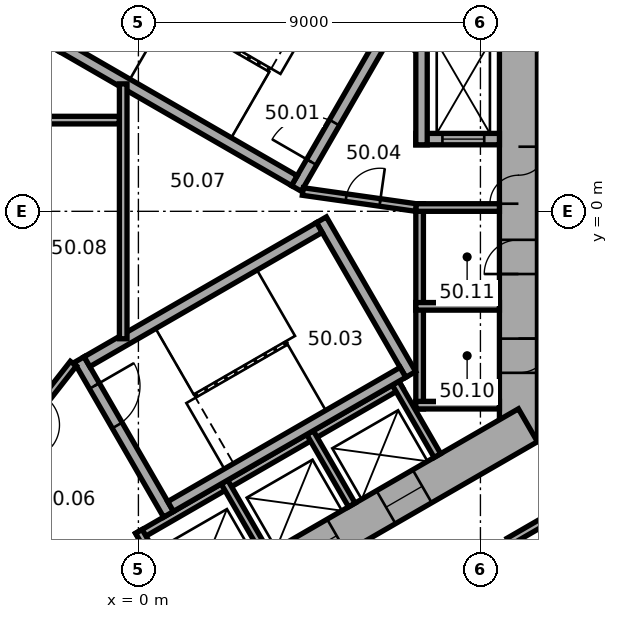
"""IFC4 building model, lengths in metres.
Left out: names, types, materials, properties, quantities, classifications, styles, units other than length and angle.
Written with IfcOpenShell. Run it as: python <this file> out.ifc"""

import sys

from ifc_helpers import new_model, si_unit, direction, frame, frame_2d, origin, place, context, subcontext, project, spatial, rectangle, extrude, element, fill, save


model = new_model("IFC4")
c1 = context("Model", 3, precision=1e-05, world=origin(), true_north=direction((0.0, 1.0)))
c2 = subcontext(c1, "Body", "Model", "MODEL_VIEW")
j1 = project(units=[si_unit("LENGTHUNIT", "METRE"), si_unit("PLANEANGLEUNIT", "RADIAN")], contexts=[c1])
p1 = place(None, origin())
s1 = spatial("IfcSite", under=j1, at=p1, CompositionType="ELEMENT")
p2 = place(p1, origin())
s2 = spatial("IfcBuilding", under=s1, at=p2, CompositionType="ELEMENT")
p3 = place(p2, frame((0.0, 0.0, 202.1)))
s3 = spatial("IfcBuildingStorey", under=s2, at=p3, CompositionType="ELEMENT", Elevation=202.1)
p4 = place(p3, frame((10.0, -6.062, 0.0), z_axis=(0.0, 0.0, 1.0), x_axis=(0.0, 1.0, 0.0)))
e1 = element("IfcWall", 1, at=p4, inside=s3, PredefinedType="SHEAR", context=c2, shape_type="SweptSolid", body=[
    extrude(rectangle(XDim=12.125, YDim=1.0, at=frame_2d((6.062, 0.0))), origin(), (0.0, 0.0, 1.0), 3.7),
])
p5 = place(p4, frame((6.262, 0.0, 0.0)))
e2 = element("IfcOpeningElement", 2, at=p5, cuts=e1, PredefinedType="OPENING", context=c2, shape_type="SweptSolid", body=[
    extrude(rectangle(XDim=1.5, YDim=2.1, at=frame_2d((0.75, 1.05))), frame((0.0, 0.51, 0.0), z_axis=(0.0, -1.0, 0.0), x_axis=(1.0, 0.0, 0.0)), (0.0, 0.0, 1.0), 1.02),
])
p6 = place(p4, frame((1.812, 0.0, 0.0)))
e3 = element("IfcOpeningElement", 3, at=p6, cuts=e1, PredefinedType="OPENING", context=c2, shape_type="SweptSolid", body=[
    extrude(rectangle(XDim=0.9, YDim=2.1, at=frame_2d((0.45, 1.05))), frame((0.0, 0.51, 0.0), z_axis=(0.0, -1.0, 0.0), x_axis=(1.0, 0.0, 0.0)), (0.0, 0.0, 1.0), 1.02),
])
p7 = place(p4, frame((4.412, 0.0, 0.0)))
e4 = element("IfcOpeningElement", 4, at=p7, cuts=e1, PredefinedType="OPENING", context=c2, shape_type="SweptSolid", body=[
    extrude(rectangle(XDim=0.9, YDim=2.1, at=frame_2d((0.45, 1.05))), frame((0.0, 0.51, 0.0), z_axis=(0.0, -1.0, 0.0), x_axis=(1.0, 0.0, 0.0)), (0.0, 0.0, 1.0), 1.02),
])
p8 = place(p3, frame((-10.25, -5.629, 0.0), z_axis=(0.0, 0.0, 1.0), x_axis=(0.866022616891, -0.50000482701, 0.0)))
e5 = element("IfcWall", 5, at=p8, inside=s3, PredefinedType="SHEAR", context=c2, shape_type="SweptSolid", body=[
    extrude(rectangle(XDim=12.125, YDim=1.0, at=frame_2d((6.062, 0.0))), origin(), (0.0, 0.0, 1.0), 3.7),
])
p9 = place(p8, frame((6.262, 0.0, 0.0)))
e6 = element("IfcOpeningElement", 6, at=p9, cuts=e5, PredefinedType="OPENING", context=c2, shape_type="SweptSolid", body=[
    extrude(rectangle(XDim=1.5, YDim=2.1, at=frame_2d((0.75, 1.05))), frame((0.0, 0.51, 0.0), z_axis=(0.0, -1.0, 0.0), x_axis=(1.0, 0.0, 0.0)), (0.0, 0.0, 1.0), 1.02),
])
p10 = place(p8, frame((1.712, 0.0, 0.0)))
e7 = element("IfcOpeningElement", 7, at=p10, cuts=e5, PredefinedType="OPENING", context=c2, shape_type="SweptSolid", body=[
    extrude(rectangle(XDim=1.1, YDim=2.1, at=frame_2d((0.55, 1.05))), frame((0.0, 0.51, 0.0), z_axis=(0.0, -1.0, 0.0), x_axis=(1.0, 0.0, 0.0)), (0.0, 0.0, 1.0), 1.02),
])
p11 = place(p8, frame((4.312, 0.0, 0.0)))
e8 = element("IfcOpeningElement", 8, at=p11, cuts=e5, PredefinedType="OPENING", context=c2, shape_type="SweptSolid", body=[
    extrude(rectangle(XDim=1.1, YDim=2.1, at=frame_2d((0.55, 1.05))), frame((0.0, 0.51, 0.0), z_axis=(0.0, -1.0, 0.0), x_axis=(1.0, 0.0, 0.0)), (0.0, 0.0, 1.0), 1.02),
])
p12 = place(p3, frame((-0.25, -11.691, 0.0), z_axis=(0.0, 0.0, 1.0), x_axis=(0.866022616891, 0.50000482701, 0.0)))
e9 = element("IfcWall", 9, at=p12, inside=s3, PredefinedType="SHEAR", context=c2, shape_type="SweptSolid", body=[
    extrude(rectangle(XDim=12.125, YDim=1.0, at=frame_2d((6.062, 0.0))), origin(), (0.0, 0.0, 1.0), 3.7),
])
p13 = place(p12, frame((2.612, 0.0, 0.0)))
e10 = element("IfcOpeningElement", 10, at=p13, cuts=e9, PredefinedType="OPENING", context=c2, shape_type="SweptSolid", body=[
    extrude(rectangle(XDim=1.1, YDim=2.1, at=frame_2d((0.55, 1.05))), frame((0.0, 0.51, 0.0), z_axis=(0.0, -1.0, 0.0), x_axis=(1.0, 0.0, 0.0)), (0.0, 0.0, 1.0), 1.02),
])
p14 = place(p12, frame((5.212, 0.0, 0.0)))
e11 = element("IfcOpeningElement", 11, at=p14, cuts=e9, PredefinedType="OPENING", context=c2, shape_type="SweptSolid", body=[
    extrude(rectangle(XDim=1.1, YDim=2.1, at=frame_2d((0.55, 1.05))), frame((0.0, 0.51, 0.0), z_axis=(0.0, -1.0, 0.0), x_axis=(1.0, 0.0, 0.0)), (0.0, 0.0, 1.0), 1.02),
])
p15 = place(p12, frame((7.812, 0.0, 0.0)))
e12 = element("IfcOpeningElement", 12, at=p15, cuts=e9, PredefinedType="OPENING", context=c2, shape_type="SweptSolid", body=[
    extrude(rectangle(XDim=1.1, YDim=2.1, at=frame_2d((0.55, 1.05))), frame((0.0, 0.51, 0.0), z_axis=(0.0, -1.0, 0.0), x_axis=(1.0, 0.0, 0.0)), (0.0, 0.0, 1.0), 1.02),
])
p16 = place(p3, frame((7.4, -5.2, 0.0), z_axis=(0.0, 0.0, 1.0), x_axis=(0.0, 1.0, 0.0)))
e13 = element("IfcWall", 13, at=p16, inside=s3, PredefinedType="PARTITIONING", context=c2, shape_type="SweptSolid", body=[
    extrude(rectangle(XDim=5.4, YDim=0.2, at=frame_2d((2.7, 0.0))), origin(), (0.0, 0.0, 1.0), 3.35),
])
for number, where, z_axis, x_axis in (
    (14, (7.3, -5.1, 0.0), (0.0, 0.0, 1.0), (1.0, 0.0, 0.0)),
    (15, (7.3, -2.5, 0.0), (0.0, 0.0, 1.0), (1.0, 0.0, 0.0)),
    (16, (7.3, 0.1, 0.0), (0.0, 0.0, 1.0), (1.0, 0.0, 0.0)),
):
    element("IfcWall", number, at=place(p3, frame(where, z_axis=z_axis, x_axis=x_axis)), inside=s3, PredefinedType="PARTITIONING", context=c2, shape_type="SweptSolid", body=[
        extrude(rectangle(XDim=2.2, YDim=0.2, at=frame_2d((1.1, 0.0))), origin(), (0.0, 0.0, 1.0), 3.35),
    ])
p17 = place(p3, frame((7.424, 4.259, 0.0), z_axis=(0.0, 0.0, 1.0), x_axis=(-0.866026010844, 0.49999894854, 0.0)))
e17 = element("IfcWall", 17, at=p17, inside=s3, PredefinedType="PARTITIONING", context=c2, shape_type="SweptSolid", body=[
    extrude(rectangle(XDim=8.0, YDim=0.2, at=frame_2d((4.0, 0.0))), origin(), (0.0, 0.0, 1.0), 3.35),
])
p18 = place(p3, frame((7.287, 4.222, 0.0), z_axis=(0.0, 0.0, 1.0), x_axis=(0.499946605688, 0.86605622881, 0.0)))
e18 = element("IfcWall", 18, at=p18, inside=s3, PredefinedType="PARTITIONING", context=c2, shape_type="SweptSolid", body=[
    extrude(rectangle(XDim=2.2, YDim=0.2, at=frame_2d((1.1, 0.0))), origin(), (0.0, 0.0, 1.0), 3.35),
])
p19 = place(p3, frame((-0.024, -8.559, 0.0), z_axis=(0.0, 0.0, 1.0), x_axis=(0.866026010844, 0.49999894854, 0.0)))
e19 = element("IfcWall", 19, at=p19, inside=s3, PredefinedType="PARTITIONING", context=c2, shape_type="SweptSolid", body=[
    extrude(rectangle(XDim=8.0, YDim=0.2, at=frame_2d((4.0, 0.0))), origin(), (0.0, 0.0, 1.0), 3.35),
])
for number, where, z_axis, x_axis in (
    (20, (0.013, -8.422, 0.0), (0.0, 0.0, 1.0), (0.5, -0.866, 0.0)),
    (21, (2.264, -7.122, 0.0), (0.0, 0.0, 1.0), (0.5, -0.866, 0.0)),
    (22, (4.516, -5.822, 0.0), (0.0, 0.0, 1.0), (0.5, -0.866, 0.0)),
    (23, (6.768, -4.522, 0.0), (0.0, 0.0, 1.0), (0.5, -0.866, 0.0)),
):
    element("IfcWall", number, at=place(p3, frame(where, z_axis=z_axis, x_axis=x_axis)), inside=s3, PredefinedType="PARTITIONING", context=c2, shape_type="SweptSolid", body=[
        extrude(rectangle(XDim=2.2, YDim=0.2, at=frame_2d((1.1, 0.0))), origin(), (0.0, 0.0, 1.0), 3.35),
    ])
p20 = place(p3, frame((4.158, 0.602, 0.0), z_axis=(0.0, 0.0, 1.0), x_axis=(0.499977259774, 0.866038532462, 0.0)))
e24 = element("IfcWall", 24, at=p20, inside=s3, PredefinedType="SHEAR", context=c2, shape_type="SweptSolid", body=[
    extrude(rectangle(XDim=4.7, YDim=0.3, at=frame_2d((2.35, 0.0))), origin(), (0.0, 0.0, 1.0), 3.35),
])
p21 = place(p20, frame((0.8, 0.0, 0.0)))
e25 = element("IfcOpeningElement", 25, at=p21, cuts=e24, PredefinedType="OPENING", context=c2, shape_type="SweptSolid", body=[
    extrude(rectangle(XDim=1.2, YDim=2.1, at=frame_2d((0.6, 1.05))), frame((0.0, 0.16, 0.0), z_axis=(0.0, -1.0, 0.0), x_axis=(1.0, 0.0, 0.0)), (0.0, 0.0, 1.0), 0.32),
])
p22 = place(p3, frame((4.103, 0.807, 0.0), z_axis=(0.0, 0.0, 1.0), x_axis=(-0.866027801685, 0.499995846692, 0.0)))
e26 = element("IfcWall", 26, at=p22, inside=s3, PredefinedType="SHEAR", context=c2, shape_type="SweptSolid", body=[
    extrude(rectangle(XDim=7.06, YDim=0.3, at=frame_2d((3.53, 0.0))), origin(), (0.0, 0.0, 1.0), 3.35),
])
p23 = place(p3, frame((-1.558, -3.902, 0.0), z_axis=(0.0, 0.0, 1.0), x_axis=(0.499977259774, -0.866038532462, 0.0)))
e27 = element("IfcWall", 27, at=p23, inside=s3, PredefinedType="SHEAR", context=c2, shape_type="SweptSolid", body=[
    extrude(rectangle(XDim=4.7, YDim=0.3, at=frame_2d((2.35, 0.0))), origin(), (0.0, 0.0, 1.0), 3.35),
])
p24 = place(p23, frame((0.8, 0.0, 0.0)))
e28 = element("IfcOpeningElement", 28, at=p24, cuts=e27, PredefinedType="OPENING", context=c2, shape_type="SweptSolid", body=[
    extrude(rectangle(XDim=1.2, YDim=2.1, at=frame_2d((0.6, 1.05))), frame((0.0, 0.16, 0.0), z_axis=(0.0, -1.0, 0.0), x_axis=(1.0, 0.0, 0.0)), (0.0, 0.0, 1.0), 0.32),
])
p25 = place(p3, frame((4.816, -0.222, 0.0), z_axis=(0.0, 0.0, 1.0), x_axis=(0.499977259774, -0.866038532462, 0.0)))
e29 = element("IfcWall", 29, at=p25, inside=s3, PredefinedType="SHEAR", context=c2, shape_type="SweptSolid", body=[
    extrude(rectangle(XDim=4.7, YDim=0.3, at=frame_2d((2.35, 0.0))), origin(), (0.0, 0.0, 1.0), 3.35),
])
for number, where, z_axis, x_axis in (
    (30, (-1.353, -3.957, 0.0), (0.0, 0.0, 1.0), (0.866, 0.5, 0.0)),
    (31, (0.847, -7.767, 0.0), (0.0, 0.0, 1.0), (0.866, 0.5, 0.0)),
):
    element("IfcWall", number, at=place(p3, frame(where, z_axis=z_axis, x_axis=x_axis)), inside=s3, PredefinedType="SHEAR", context=c2, shape_type="SweptSolid", body=[
        extrude(rectangle(XDim=7.06, YDim=0.3, at=frame_2d((3.53, 0.0))), origin(), (0.0, 0.0, 1.0), 3.35),
    ])
p26 = place(p3, frame((7.3, 1.9, 0.0), z_axis=(0.0, 0.0, 1.0), x_axis=(1.0, 0.0, 0.0)))
e32 = element("IfcWall", 32, at=p26, inside=s3, PredefinedType="SHEAR", context=c2, shape_type="SweptSolid", body=[
    extrude(rectangle(XDim=2.2, YDim=0.3, at=frame_2d((1.1, 0.0))), origin(), (0.0, 0.0, 1.0), 3.35),
])
p27 = place(p26, frame((0.7, 0.0, 0.0)))
e33 = element("IfcOpeningElement", 33, at=p27, cuts=e32, PredefinedType="OPENING", context=c2, shape_type="SweptSolid", body=[
    extrude(rectangle(XDim=1.1, YDim=2.1, at=frame_2d((0.55, 1.05))), frame((0.0, 0.16, 0.0), z_axis=(0.0, -1.0, 0.0), x_axis=(1.0, 0.0, 0.0)), (0.0, 0.0, 1.0), 0.32),
])
p28 = place(p3, frame((7.45, 1.75, 0.0), z_axis=(0.0, 0.0, 1.0), x_axis=(0.0, 1.0, 0.0)))
e34 = element("IfcWall", 34, at=p28, inside=s3, PredefinedType="SHEAR", context=c2, shape_type="SweptSolid", body=[
    extrude(rectangle(XDim=3.35, YDim=0.3, at=frame_2d((1.675, 0.0))), origin(), (0.0, 0.0, 1.0), 3.35),
])
p29 = place(p3, frame((4.327, 0.521, 0.0), z_axis=(0.0, 0.0, 1.0), x_axis=(0.990124376366, -0.14019172346, 0.0)))
e35 = element("IfcWall", 35, at=p29, inside=s3, PredefinedType="PARTITIONING", context=c2, shape_type="SweptSolid", body=[
    extrude(rectangle(XDim=3.002, YDim=0.2, at=frame_2d((1.501, 0.0))), origin(), (0.0, 0.0, 1.0), 3.35),
])
p30 = place(p29, frame((1.15, 0.0, 0.0)))
e36 = element("IfcOpeningElement", 36, at=p30, cuts=e35, PredefinedType="OPENING", context=c2, shape_type="SweptSolid", body=[
    extrude(rectangle(XDim=0.9, YDim=2.1, at=frame_2d((0.45, 1.05))), frame((0.0, 0.11, 0.0), z_axis=(0.0, -1.0, 0.0), x_axis=(1.0, 0.0, 0.0)), (0.0, 0.0, 1.0), 0.22),
])
p31 = place(p3, frame((-1.712, -4.008, 0.0), z_axis=(0.0, 0.0, 1.0), x_axis=(-0.616549420702, -0.787316208287, 0.0)))
e37 = element("IfcWall", 37, at=p31, inside=s3, PredefinedType="PARTITIONING", context=c2, shape_type="SweptSolid", body=[
    extrude(rectangle(XDim=3.002, YDim=0.2, at=frame_2d((1.501, 0.0))), origin(), (0.0, 0.0, 1.0), 3.35),
])
p32 = place(p31, frame((1.15, 0.0, 0.0)))
e38 = element("IfcOpeningElement", 38, at=p32, cuts=e37, PredefinedType="OPENING", context=c2, shape_type="SweptSolid", body=[
    extrude(rectangle(XDim=0.9, YDim=2.1, at=frame_2d((0.45, 1.05))), frame((0.0, 0.11, 0.0), z_axis=(0.0, -1.0, 0.0), x_axis=(1.0, 0.0, 0.0)), (0.0, 0.0, 1.0), 0.22),
])
p33 = place(p3, frame((-2.72, 2.4, 0.0), z_axis=(0.0, 0.0, 1.0), x_axis=(1.0, 0.0, 0.0)))
e39 = element("IfcWall", 39, at=p33, inside=s3, PredefinedType="PARTITIONING", context=c2, shape_type="SweptSolid", body=[
    extrude(rectangle(XDim=2.22, YDim=0.2, at=frame_2d((1.11, 0.0))), origin(), (0.0, 0.0, 1.0), 3.35),
])
p34 = place(p3, frame((-0.4, -3.353, 0.0), z_axis=(0.0, 0.0, 1.0), x_axis=(0.0, 1.0, 0.0)))
e40 = element("IfcWall", 40, at=p34, inside=s3, PredefinedType="PARTITIONING", context=c2, shape_type="SweptSolid", body=[
    extrude(rectangle(XDim=6.707, YDim=0.2, at=frame_2d((3.353, 0.0))), origin(), (0.0, 0.0, 1.0), 3.35),
])
p35 = place(p3, frame((9.752, -8.688, 0.0), z_axis=(0.0, 0.0, 1.0), x_axis=(0.865974105138, 0.500088841337, 0.0)))
e41 = element("IfcWall", 41, at=p35, inside=s3, PredefinedType="PARTITIONING", context=c2, shape_type="SweptSolid", body=[
    extrude(rectangle(XDim=1.961, YDim=0.2, at=frame_2d((0.98, 0.0))), origin(), (0.0, 0.0, 1.0), 3.35),
])
p36 = place(p5, origin())
e42 = element("IfcDoor", 42, at=p36, inside=s3, OperationType="DOUBLE_DOOR_SINGLE_SWING", PredefinedType="DOOR", context=c2, shape_type="SweptSolid", body=[
    extrude(rectangle(XDim=1.5, YDim=2.1, at=frame_2d((0.75, 1.05))), frame((0.0, 0.025, 0.0), z_axis=(0.0, -1.0, 0.0), x_axis=(1.0, 0.0, 0.0)), (0.0, 0.0, 1.0), 0.05),
])
fill(e2, e42)
p37 = place(p21, origin())
e43 = element("IfcDoor", 43, at=p37, inside=s3, OperationType="SINGLE_SWING_RIGHT", PredefinedType="DOOR", context=c2, shape_type="SweptSolid", body=[
    extrude(rectangle(XDim=1.2, YDim=2.1, at=frame_2d((0.6, 1.05))), frame((0.0, 0.025, 0.0), z_axis=(0.0, -1.0, 0.0), x_axis=(1.0, 0.0, 0.0)), (0.0, 0.0, 1.0), 0.05),
])
fill(e25, e43)
p38 = place(p24, origin())
e44 = element("IfcDoor", 44, at=p38, inside=s3, OperationType="SINGLE_SWING_RIGHT", PredefinedType="DOOR", context=c2, shape_type="SweptSolid", body=[
    extrude(rectangle(XDim=1.2, YDim=2.1, at=frame_2d((0.6, 1.05))), frame((0.0, 0.025, 0.0), z_axis=(0.0, -1.0, 0.0), x_axis=(1.0, 0.0, 0.0)), (0.0, 0.0, 1.0), 0.05),
])
fill(e28, e44)
p39 = place(p30, origin())
e45 = element("IfcDoor", 45, at=p39, inside=s3, OperationType="SINGLE_SWING_LEFT", PredefinedType="DOOR", context=c2, shape_type="SweptSolid", body=[
    extrude(rectangle(XDim=0.9, YDim=2.1, at=frame_2d((0.45, 1.05))), frame((0.0, 0.025, 0.0), z_axis=(0.0, -1.0, 0.0), x_axis=(1.0, 0.0, 0.0)), (0.0, 0.0, 1.0), 0.05),
])
fill(e36, e45)
p40 = place(p6, origin())
e46 = element("IfcDoor", 46, at=p40, inside=s3, OperationType="SINGLE_SWING_LEFT", PredefinedType="DOOR", context=c2, shape_type="SweptSolid", body=[
    extrude(rectangle(XDim=0.9, YDim=2.1, at=frame_2d((0.45, 1.05))), frame((0.0, 0.025, 0.0), z_axis=(0.0, -1.0, 0.0), x_axis=(1.0, 0.0, 0.0)), (0.0, 0.0, 1.0), 0.05),
])
fill(e3, e46)
p41 = place(p7, origin())
e47 = element("IfcDoor", 47, at=p41, inside=s3, OperationType="SINGLE_SWING_LEFT", PredefinedType="DOOR", context=c2, shape_type="SweptSolid", body=[
    extrude(rectangle(XDim=0.9, YDim=2.1, at=frame_2d((0.45, 1.05))), frame((0.0, 0.025, 0.0), z_axis=(0.0, -1.0, 0.0), x_axis=(1.0, 0.0, 0.0)), (0.0, 0.0, 1.0), 0.05),
])
fill(e4, e47)
p42 = place(p27, origin())
e48 = element("IfcDoor", 48, at=p42, inside=s3, OperationType="DOUBLE_DOOR_SLIDING", PredefinedType="DOOR", context=c2, shape_type="SweptSolid", body=[
    extrude(rectangle(XDim=1.1, YDim=2.1, at=frame_2d((0.55, 1.05))), frame((0.0, 0.025, 0.0), z_axis=(0.0, -1.0, 0.0), x_axis=(1.0, 0.0, 0.0)), (0.0, 0.0, 1.0), 0.05),
])
fill(e33, e48)
p43 = place(p14, origin())
e49 = element("IfcDoor", 49, at=p43, inside=s3, OperationType="DOUBLE_DOOR_SLIDING", PredefinedType="DOOR", context=c2, shape_type="SweptSolid", body=[
    extrude(rectangle(XDim=1.1, YDim=2.1, at=frame_2d((0.55, 1.05))), frame((0.0, 0.025, 0.0), z_axis=(0.0, -1.0, 0.0), x_axis=(1.0, 0.0, 0.0)), (0.0, 0.0, 1.0), 0.05),
])
fill(e11, e49)
p44 = place(p15, origin())
e50 = element("IfcDoor", 50, at=p44, inside=s3, OperationType="DOUBLE_DOOR_SLIDING", PredefinedType="DOOR", context=c2, shape_type="SweptSolid", body=[
    extrude(rectangle(XDim=1.1, YDim=2.1, at=frame_2d((0.55, 1.05))), frame((0.0, 0.025, 0.0), z_axis=(0.0, -1.0, 0.0), x_axis=(1.0, 0.0, 0.0)), (0.0, 0.0, 1.0), 0.05),
])
fill(e12, e50)
save(model, sys.argv[1])
